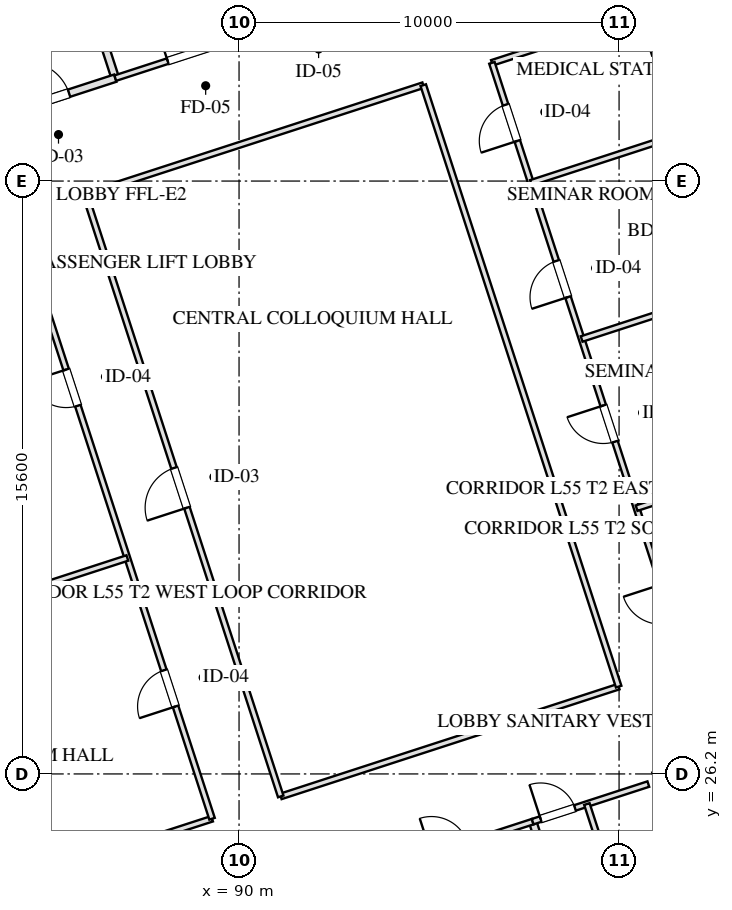
"""IFC4 building model, lengths in metres.
Left out: names, types, materials, properties, quantities, classifications, styles, units other than length and angle.
Written with IfcOpenShell. Run it as: python <this file> out.ifc"""

import sys

from ifc_helpers import new_model, si_unit, direction, frame, frame_2d, origin, place, context, subcontext, project, spatial, rectangle, extrude, element, fill, save


model = new_model("IFC4")
c1 = context("Model", 3, precision=1e-05, world=origin(), true_north=direction((0.0, 1.0)))
c2 = subcontext(c1, "Body", "Model", "MODEL_VIEW")
j1 = project(units=[si_unit("LENGTHUNIT", "METRE"), si_unit("PLANEANGLEUNIT", "RADIAN")], contexts=[c1])
p1 = place(None, origin())
s1 = spatial("IfcSite", under=j1, at=p1, CompositionType="ELEMENT")
p2 = place(p1, origin())
s2 = spatial("IfcBuilding", under=s1, at=p2, CompositionType="ELEMENT")
p3 = place(p2, frame((0.0, 0.0, 205.85)))
s3 = spatial("IfcBuildingStorey", under=s2, at=p3, CompositionType="ELEMENT", Elevation=205.85)
p4 = place(p3, frame((97.382, 56.586, 0.0), z_axis=(0.0, 0.0, 1.0), x_axis=(0.309016491071, -0.951056679828, 0.0)))
e1 = element("IfcWall", 1, at=p4, inside=s3, PredefinedType="SOLIDWALL", context=c2, shape_type="SweptSolid", body=[
    extrude(rectangle(XDim=38.4, YDim=0.4, at=frame_2d((19.2, 0.0))), origin(), (0.0, 0.0, 1.0), 2.61),
])
p5 = place(p4, frame((24.55, 0.0, 0.75)))
e2 = element("IfcOpeningElement", 2, at=p5, cuts=e1, PredefinedType="OPENING", context=c2, shape_type="SweptSolid", body=[
    extrude(rectangle(XDim=2.1, YDim=1.46, at=frame_2d((1.05, 0.73))), frame((0.0, 0.21, 0.0), z_axis=(0.0, -1.0, 0.0), x_axis=(1.0, 0.0, 0.0)), (0.0, 0.0, 1.0), 0.42),
])
p6 = place(p4, frame((20.75, 0.0, 0.75)))
e3 = element("IfcOpeningElement", 3, at=p6, cuts=e1, PredefinedType="OPENING", context=c2, shape_type="SweptSolid", body=[
    extrude(rectangle(XDim=2.1, YDim=1.46, at=frame_2d((1.05, 0.73))), frame((0.0, 0.21, 0.0), z_axis=(0.0, -1.0, 0.0), x_axis=(1.0, 0.0, 0.0)), (0.0, 0.0, 1.0), 0.42),
])
p7 = place(p4, frame((16.05, 0.0, 0.0)))
e4 = element("IfcOpeningElement", 4, at=p7, cuts=e1, PredefinedType="OPENING", context=c2, shape_type="SweptSolid", body=[
    extrude(rectangle(XDim=1.1, YDim=2.15, at=frame_2d((0.55, 1.075))), frame((0.0, 0.21, 0.0), z_axis=(0.0, -1.0, 0.0), x_axis=(1.0, 0.0, 0.0)), (0.0, 0.0, 1.0), 0.42),
])
p8 = place(p3, frame((97.727, 24.944, 0.0), z_axis=(0.0, 0.0, 1.0), x_axis=(0.309016001439, -0.951056838919, 0.0)))
e5 = element("IfcWall", 5, at=p8, inside=s3, PredefinedType="PARTITIONING", context=c2, shape_type="SweptSolid", body=[
    extrude(rectangle(XDim=8.43, YDim=0.2, at=frame_2d((4.215, 0.0))), origin(), (0.0, 0.0, 1.0), 3.175),
])
p9 = place(p3, frame((93.542, 23.585, 0.0), z_axis=(0.0, 0.0, 1.0), x_axis=(0.951063829732, 0.308994485023, 0.0)))
e6 = element("IfcWall", 6, at=p9, inside=s3, PredefinedType="PARTITIONING", context=c2, shape_type="SweptSolid", body=[
    extrude(rectangle(XDim=4.4, YDim=0.15, at=frame_2d((2.2, 0.0))), origin(), (0.0, 0.0, 1.0), 3.175),
])
p10 = place(p9, frame((1.6, 0.0, 0.0)))
e7 = element("IfcOpeningElement", 7, at=p10, cuts=e6, PredefinedType="OPENING", context=c2, shape_type="SweptSolid", body=[
    extrude(rectangle(XDim=1.0, YDim=2.05, at=frame_2d((0.5, 1.025))), frame((0.0, 0.085, 0.0), z_axis=(0.0, -1.0, 0.0), x_axis=(1.0, 0.0, 0.0)), (0.0, 0.0, 1.0), 0.17),
])
p11 = place(p3, frame((97.727, 24.944, 0.0), z_axis=(0.0, 0.0, 1.0), x_axis=(0.951036872128, 0.309077446369, 0.0)))
e8 = element("IfcWall", 8, at=p11, inside=s3, PredefinedType="PARTITIONING", context=c2, shape_type="SweptSolid", body=[
    extrude(rectangle(XDim=3.2, YDim=0.15, at=frame_2d((1.6, 0.0))), origin(), (0.0, 0.0, 1.0), 3.175),
])
p12 = place(p11, frame((0.22, 0.0, 0.0)))
e9 = element("IfcOpeningElement", 9, at=p12, cuts=e8, PredefinedType="OPENING", context=c2, shape_type="SweptSolid", body=[
    extrude(rectangle(XDim=0.95, YDim=2.05, at=frame_2d((0.475, 1.025))), frame((0.0, 0.085, 0.0), z_axis=(0.0, -1.0, 0.0), x_axis=(1.0, 0.0, 0.0)), (0.0, 0.0, 1.0), 0.17),
])
p13 = place(p3, frame((99.153, 25.408, 0.0), z_axis=(0.0, 0.0, 1.0), x_axis=(0.309016001439, -0.951056838919, 0.0)))
e10 = element("IfcWall", 10, at=p13, inside=s3, PredefinedType="PARTITIONING", context=c2, shape_type="SweptSolid", body=[
    extrude(rectangle(XDim=8.43, YDim=0.15, at=frame_2d((4.215, 0.0))), origin(), (0.0, 0.0, 1.0), 3.175),
])
p14 = place(p13, frame((2.55, 0.0, 0.0)))
e11 = element("IfcOpeningElement", 11, at=p14, cuts=e10, PredefinedType="OPENING", context=c2, shape_type="SweptSolid", body=[
    extrude(rectangle(XDim=0.95, YDim=2.05, at=frame_2d((0.475, 1.025))), frame((0.0, 0.085, 0.0), z_axis=(0.0, -1.0, 0.0), x_axis=(1.0, 0.0, 0.0)), (0.0, 0.0, 1.0), 0.17),
])
p15 = place(p13, frame((4.7, 0.0, 0.0)))
e12 = element("IfcOpeningElement", 12, at=p15, cuts=e10, PredefinedType="OPENING", context=c2, shape_type="SweptSolid", body=[
    extrude(rectangle(XDim=0.9, YDim=2.05, at=frame_2d((0.45, 1.025))), frame((0.0, 0.085, 0.0), z_axis=(0.0, -1.0, 0.0), x_axis=(1.0, 0.0, 0.0)), (0.0, 0.0, 1.0), 0.17),
])
p16 = place(p13, frame((6.8, 0.0, 0.0)))
e13 = element("IfcOpeningElement", 13, at=p16, cuts=e10, PredefinedType="OPENING", context=c2, shape_type="SweptSolid", body=[
    extrude(rectangle(XDim=0.9, YDim=2.05, at=frame_2d((0.45, 1.025))), frame((0.0, 0.085, 0.0), z_axis=(0.0, -1.0, 0.0), x_axis=(1.0, 0.0, 0.0)), (0.0, 0.0, 1.0), 0.17),
])
p17 = place(p3, frame((86.743, 44.508, 0.0), z_axis=(0.0, 0.0, 1.0), x_axis=(-0.309016001439, 0.951056838919, 0.0)))
e14 = element("IfcWall", 14, at=p17, inside=s3, PredefinedType="PARTITIONING", context=c2, shape_type="SweptSolid", body=[
    extrude(rectangle(XDim=8.43, YDim=0.2, at=frame_2d((4.215, 0.0))), origin(), (0.0, 0.0, 1.0), 3.175),
])
p18 = place(p3, frame((83.101, 43.324, 0.0), z_axis=(0.0, 0.0, 1.0), x_axis=(0.951052804469, 0.309028417967, 0.0)))
e15 = element("IfcWall", 15, at=p18, inside=s3, PredefinedType="PARTITIONING", context=c2, shape_type="SweptSolid", body=[
    extrude(rectangle(XDim=3.83, YDim=0.2, at=frame_2d((1.915, 0.0))), origin(), (0.0, 0.0, 1.0), 3.175),
])
p19 = place(p18, frame((1.35, 0.0, 0.0)))
e16 = element("IfcOpeningElement", 16, at=p19, cuts=e15, PredefinedType="OPENING", context=c2, shape_type="SweptSolid", body=[
    extrude(rectangle(XDim=1.2, YDim=2.05, at=frame_2d((0.6, 1.025))), frame((0.0, 0.11, 0.0), z_axis=(0.0, -1.0, 0.0), x_axis=(1.0, 0.0, 0.0)), (0.0, 0.0, 1.0), 0.22),
])
p20 = place(p3, frame((86.743, 44.508, 0.0), z_axis=(0.0, 0.0, 1.0), x_axis=(0.951063829732, 0.308994485023, 0.0)))
e17 = element("IfcWall", 17, at=p20, inside=s3, PredefinedType="PARTITIONING", context=c2, shape_type="SweptSolid", body=[
    extrude(rectangle(XDim=4.4, YDim=0.15, at=frame_2d((2.2, 0.0))), origin(), (0.0, 0.0, 1.0), 3.175),
])
p21 = place(p20, frame((1.45, 0.0, 0.0)))
e18 = element("IfcOpeningElement", 18, at=p21, cuts=e17, PredefinedType="OPENING", context=c2, shape_type="SweptSolid", body=[
    extrude(rectangle(XDim=1.5, YDim=2.05, at=frame_2d((0.75, 1.025))), frame((0.0, 0.085, 0.0), z_axis=(0.0, -1.0, 0.0), x_axis=(1.0, 0.0, 0.0)), (0.0, 0.0, 1.0), 0.17),
])
p22 = place(p3, frame((79.447, 21.823, 0.0), z_axis=(0.0, 0.0, 1.0), x_axis=(0.951057294912, 0.309014598029, 0.0)))
e19 = element("IfcWall", 19, at=p22, inside=s3, PredefinedType="PARTITIONING", context=c2, shape_type="SweptSolid", body=[
    extrude(rectangle(XDim=10.35, YDim=0.15, at=frame_2d((5.175, 0.0))), origin(), (0.0, 0.0, 1.0), 3.175),
])
for number, where, z_axis, x_axis in (
    (20, (91.097, 25.608, 0.0), (0.0, 0.0, 1.0), (0.951, 0.309, 0.0)),
    (21, (85.955, 41.434, 0.0), (0.0, 0.0, 1.0), (0.951, 0.309, 0.0)),
):
    element("IfcWall", number, at=place(p3, frame(where, z_axis=z_axis, x_axis=x_axis)), inside=s3, PredefinedType="PARTITIONING", context=c2, shape_type="SweptSolid", body=[
        extrude(rectangle(XDim=9.35, YDim=0.15, at=frame_2d((4.675, 0.0))), origin(), (0.0, 0.0, 1.0), 3.175),
    ])
p23 = place(p3, frame((96.654, 44.91, 0.0), z_axis=(0.0, 0.0, 1.0), x_axis=(0.951044133184, 0.309055103076, 0.0)))
e22 = element("IfcWall", 22, at=p23, inside=s3, PredefinedType="PARTITIONING", context=c2, shape_type="SweptSolid", body=[
    extrude(rectangle(XDim=4.1, YDim=0.15, at=frame_2d((2.05, 0.0))), origin(), (0.0, 0.0, 1.0), 3.175),
])
p24 = place(p3, frame((89.29, 25.021, 0.0), z_axis=(0.0, 0.0, 1.0), x_axis=(-0.309004459387, 0.951060589068, 0.0)))
e23 = element("IfcWall", 23, at=p24, inside=s3, PredefinedType="PARTITIONING", context=c2, shape_type="SweptSolid", body=[
    extrude(rectangle(XDim=16.64, YDim=0.15, at=frame_2d((8.32, 0.0))), origin(), (0.0, 0.0, 1.0), 3.175),
])
p25 = place(p24, frame((3.107, 0.0, 0.0)))
e24 = element("IfcOpeningElement", 24, at=p25, cuts=e23, PredefinedType="OPENING", context=c2, shape_type="SweptSolid", body=[
    extrude(rectangle(XDim=1.0, YDim=2.05, at=frame_2d((0.5, 1.025))), frame((0.0, 0.085, 0.0), z_axis=(0.0, -1.0, 0.0), x_axis=(1.0, 0.0, 0.0)), (0.0, 0.0, 1.0), 0.17),
])
p26 = place(p24, frame((11.427, 0.0, 0.0)))
e25 = element("IfcOpeningElement", 25, at=p26, cuts=e23, PredefinedType="OPENING", context=c2, shape_type="SweptSolid", body=[
    extrude(rectangle(XDim=1.0, YDim=2.05, at=frame_2d((0.5, 1.025))), frame((0.0, 0.085, 0.0), z_axis=(0.0, -1.0, 0.0), x_axis=(1.0, 0.0, 0.0)), (0.0, 0.0, 1.0), 0.17),
])
p27 = place(p3, frame((91.097, 25.608, 0.0), z_axis=(0.0, 0.0, 1.0), x_axis=(-0.30901773025, 0.951056277195, 0.0)))
e26 = element("IfcWall", 26, at=p27, inside=s3, PredefinedType="PARTITIONING", context=c2, shape_type="SweptSolid", body=[
    extrude(rectangle(XDim=16.64, YDim=0.15, at=frame_2d((8.32, 0.0))), origin(), (0.0, 0.0, 1.0), 3.175),
])
p28 = place(p27, frame((7.987, 0.0, 0.0)))
e27 = element("IfcOpeningElement", 27, at=p28, cuts=e26, PredefinedType="OPENING", context=c2, shape_type="SweptSolid", body=[
    extrude(rectangle(XDim=1.1, YDim=2.05, at=frame_2d((0.55, 1.025))), frame((0.0, 0.085, 0.0), z_axis=(0.0, -1.0, 0.0), x_axis=(1.0, 0.0, 0.0)), (0.0, 0.0, 1.0), 0.17),
])
p29 = place(p3, frame((99.989, 28.498, 0.0), z_axis=(0.0, 0.0, 1.0), x_axis=(-0.30901773025, 0.951056277195, 0.0)))
e28 = element("IfcWall", 28, at=p29, inside=s3, PredefinedType="PARTITIONING", context=c2, shape_type="SweptSolid", body=[
    extrude(rectangle(XDim=16.64, YDim=0.15, at=frame_2d((8.32, 0.0))), origin(), (0.0, 0.0, 1.0), 3.175),
])
p30 = place(p3, frame((101.796, 29.085, 0.0), z_axis=(0.0, 0.0, 1.0), x_axis=(-0.309022042254, 0.951054876125, 0.0)))
e29 = element("IfcWall", 29, at=p30, inside=s3, PredefinedType="PARTITIONING", context=c2, shape_type="SweptSolid", body=[
    extrude(rectangle(XDim=16.64, YDim=0.15, at=frame_2d((8.32, 0.0))), origin(), (0.0, 0.0, 1.0), 3.175),
])
p31 = place(p30, frame((1.16, 0.0, 0.0)))
e30 = element("IfcOpeningElement", 30, at=p31, cuts=e29, PredefinedType="OPENING", context=c2, shape_type="SweptSolid", body=[
    extrude(rectangle(XDim=1.05, YDim=2.05, at=frame_2d((0.525, 1.025))), frame((0.0, 0.085, 0.0), z_axis=(0.0, -1.0, 0.0), x_axis=(1.0, 0.0, 0.0)), (0.0, 0.0, 1.0), 0.17),
])
p32 = place(p30, frame((6.16, 0.0, 0.0)))
e31 = element("IfcOpeningElement", 31, at=p32, cuts=e29, PredefinedType="OPENING", context=c2, shape_type="SweptSolid", body=[
    extrude(rectangle(XDim=1.0, YDim=2.05, at=frame_2d((0.5, 1.025))), frame((0.0, 0.085, 0.0), z_axis=(0.0, -1.0, 0.0), x_axis=(1.0, 0.0, 0.0)), (0.0, 0.0, 1.0), 0.17),
])
p33 = place(p30, frame((10.16, 0.0, 0.0)))
e32 = element("IfcOpeningElement", 32, at=p33, cuts=e29, PredefinedType="OPENING", context=c2, shape_type="SweptSolid", body=[
    extrude(rectangle(XDim=1.0, YDim=2.05, at=frame_2d((0.5, 1.025))), frame((0.0, 0.085, 0.0), z_axis=(0.0, -1.0, 0.0), x_axis=(1.0, 0.0, 0.0)), (0.0, 0.0, 1.0), 0.17),
])
p34 = place(p30, frame((14.48, 0.0, 0.0)))
e33 = element("IfcOpeningElement", 33, at=p34, cuts=e29, PredefinedType="OPENING", context=c2, shape_type="SweptSolid", body=[
    extrude(rectangle(XDim=1.0, YDim=2.05, at=frame_2d((0.5, 1.025))), frame((0.0, 0.085, 0.0), z_axis=(0.0, -1.0, 0.0), x_axis=(1.0, 0.0, 0.0)), (0.0, 0.0, 1.0), 0.17),
])
p35 = place(p3, frame((77.217, 28.684, 0.0), z_axis=(0.0, 0.0, 1.0), x_axis=(0.951059547341, 0.309007665621, 0.0)))
e34 = element("IfcWall", 34, at=p35, inside=s3, PredefinedType="PARTITIONING", context=c2, shape_type="SweptSolid", body=[
    extrude(rectangle(XDim=10.35, YDim=0.15, at=frame_2d((5.175, 0.0))), origin(), (0.0, 0.0, 1.0), 3.175),
])
p36 = place(p3, frame((100.461, 33.193, 0.0), z_axis=(0.0, 0.0, 1.0), x_axis=(0.951061634685, 0.309001241148, 0.0)))
e35 = element("IfcWall", 35, at=p36, inside=s3, PredefinedType="PARTITIONING", context=c2, shape_type="SweptSolid", body=[
    extrude(rectangle(XDim=4.1, YDim=0.15, at=frame_2d((2.05, 0.0))), origin(), (0.0, 0.0, 1.0), 3.175),
])
for number, where, z_axis, x_axis in (
    (36, (99.015, 37.644, 0.0), (0.0, 0.0, 1.0), (0.951, 0.309, 0.0)),
    (37, (97.68, 41.753, 0.0), (0.0, 0.0, 1.0), (0.951, 0.309, 0.0)),
):
    element("IfcWall", number, at=place(p3, frame(where, z_axis=z_axis, x_axis=x_axis)), inside=s3, PredefinedType="PARTITIONING", context=c2, shape_type="SweptSolid", body=[
        extrude(rectangle(XDim=4.1, YDim=0.15, at=frame_2d((2.05, 0.0))), origin(), (0.0, 0.0, 1.0), 3.175),
    ])
p37 = place(p12, origin())
e38 = element("IfcDoor", 38, at=p37, inside=s3, OperationType="SINGLE_SWING_LEFT", PredefinedType="DOOR", context=c2, shape_type="SweptSolid", body=[
    extrude(rectangle(XDim=0.95, YDim=2.05, at=frame_2d((0.475, 1.025))), frame((0.0, 0.025, 0.0), z_axis=(0.0, -1.0, 0.0), x_axis=(1.0, 0.0, 0.0)), (0.0, 0.0, 1.0), 0.05),
])
fill(e9, e38)
p38 = place(p19, origin())
e39 = element("IfcDoor", 39, at=p38, inside=s3, OperationType="SINGLE_SWING_LEFT", PredefinedType="DOOR", context=c2, shape_type="SweptSolid", body=[
    extrude(rectangle(XDim=1.2, YDim=2.05, at=frame_2d((0.6, 1.025))), frame((0.0, 0.025, 0.0), z_axis=(0.0, -1.0, 0.0), x_axis=(1.0, 0.0, 0.0)), (0.0, 0.0, 1.0), 0.05),
])
fill(e16, e39)
p39 = place(p21, origin())
e40 = element("IfcDoor", 40, at=p39, inside=s3, OperationType="SINGLE_SWING_LEFT", PredefinedType="DOOR", context=c2, shape_type="SweptSolid", body=[
    extrude(rectangle(XDim=1.5, YDim=2.05, at=frame_2d((0.75, 1.025))), frame((0.0, 0.025, 0.0), z_axis=(0.0, -1.0, 0.0), x_axis=(1.0, 0.0, 0.0)), (0.0, 0.0, 1.0), 0.05),
])
fill(e18, e40)
p40 = place(p25, origin())
e41 = element("IfcDoor", 41, at=p40, inside=s3, OperationType="SINGLE_SWING_LEFT", PredefinedType="DOOR", context=c2, shape_type="SweptSolid", body=[
    extrude(rectangle(XDim=1.0, YDim=2.05, at=frame_2d((0.5, 1.025))), frame((0.0, 0.025, 0.0), z_axis=(0.0, -1.0, 0.0), x_axis=(1.0, 0.0, 0.0)), (0.0, 0.0, 1.0), 0.05),
])
fill(e24, e41)
p41 = place(p26, origin())
e42 = element("IfcDoor", 42, at=p41, inside=s3, OperationType="SINGLE_SWING_RIGHT", PredefinedType="DOOR", context=c2, shape_type="SweptSolid", body=[
    extrude(rectangle(XDim=1.0, YDim=2.05, at=frame_2d((0.5, 1.025))), frame((0.0, 0.025, 0.0), z_axis=(0.0, -1.0, 0.0), x_axis=(1.0, 0.0, 0.0)), (0.0, 0.0, 1.0), 0.05),
])
fill(e25, e42)
p42 = place(p28, origin())
e43 = element("IfcDoor", 43, at=p42, inside=s3, OperationType="SINGLE_SWING_LEFT", PredefinedType="DOOR", context=c2, shape_type="SweptSolid", body=[
    extrude(rectangle(XDim=1.1, YDim=2.05, at=frame_2d((0.55, 1.025))), frame((0.0, 0.025, 0.0), z_axis=(0.0, -1.0, 0.0), x_axis=(1.0, 0.0, 0.0)), (0.0, 0.0, 1.0), 0.05),
])
fill(e27, e43)
p43 = place(p32, origin())
e44 = element("IfcDoor", 44, at=p43, inside=s3, OperationType="SINGLE_SWING_RIGHT", PredefinedType="DOOR", context=c2, shape_type="SweptSolid", body=[
    extrude(rectangle(XDim=1.0, YDim=2.05, at=frame_2d((0.5, 1.025))), frame((0.0, 0.025, 0.0), z_axis=(0.0, -1.0, 0.0), x_axis=(1.0, 0.0, 0.0)), (0.0, 0.0, 1.0), 0.05),
])
fill(e31, e44)
p44 = place(p33, origin())
e45 = element("IfcDoor", 45, at=p44, inside=s3, OperationType="SINGLE_SWING_LEFT", PredefinedType="DOOR", context=c2, shape_type="SweptSolid", body=[
    extrude(rectangle(XDim=1.0, YDim=2.05, at=frame_2d((0.5, 1.025))), frame((0.0, 0.025, 0.0), z_axis=(0.0, -1.0, 0.0), x_axis=(1.0, 0.0, 0.0)), (0.0, 0.0, 1.0), 0.05),
])
fill(e32, e45)
p45 = place(p34, origin())
e46 = element("IfcDoor", 46, at=p45, inside=s3, OperationType="SINGLE_SWING_LEFT", PredefinedType="DOOR", context=c2, shape_type="SweptSolid", body=[
    extrude(rectangle(XDim=1.0, YDim=2.05, at=frame_2d((0.5, 1.025))), frame((0.0, 0.025, 0.0), z_axis=(0.0, -1.0, 0.0), x_axis=(1.0, 0.0, 0.0)), (0.0, 0.0, 1.0), 0.05),
])
fill(e33, e46)
save(model, sys.argv[1])
